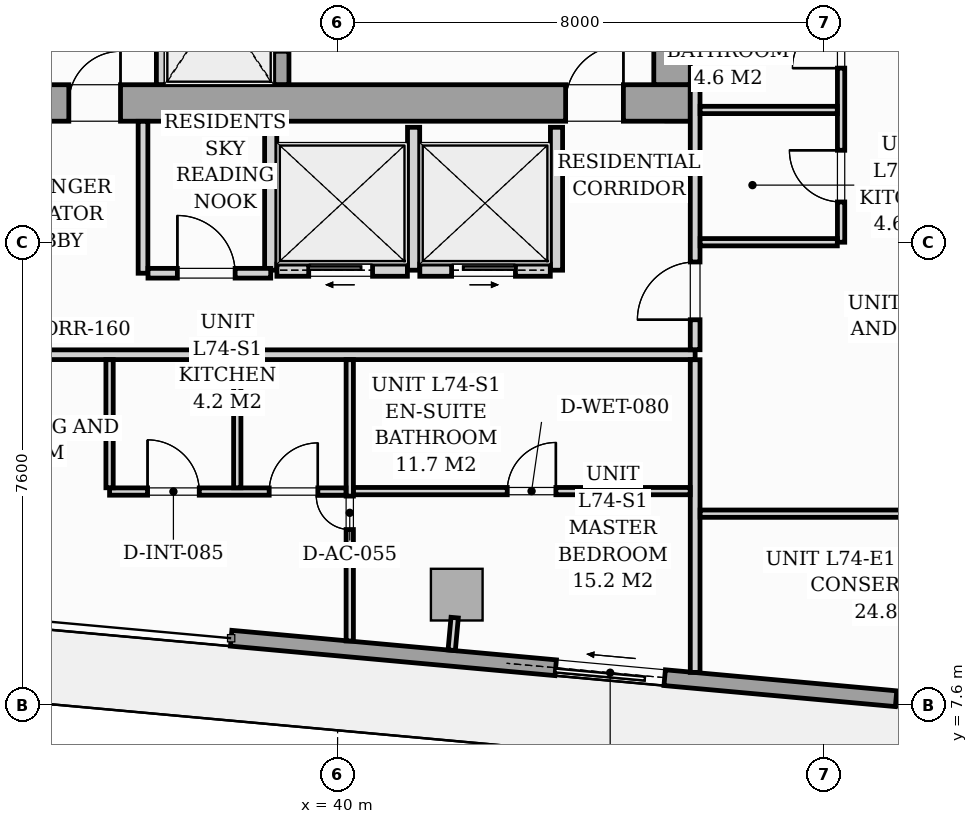
"""IFC4 building model, lengths in metres.
Left out: names, types, materials, properties, quantities, classifications, styles, units other than length and angle.
Written with IfcOpenShell. Run it as: python <this file> out.ifc"""

import sys

from ifc_helpers import new_model, si_unit, direction, frame, frame_2d, origin, origin_2d, place, context, subcontext, project, spatial, rectangle, i_section, extrude, source, transform, mapped, element, fill, save


model = new_model("IFC4")
c1 = context("Model", 3, precision=1e-05, world=origin(), true_north=direction((0.0, 1.0)))
c2 = subcontext(c1, "Body", "Model", "MODEL_VIEW")
j1 = project(units=[si_unit("LENGTHUNIT", "METRE"), si_unit("PLANEANGLEUNIT", "RADIAN")], contexts=[c1])
p1 = place(None, origin())
s1 = spatial("IfcSite", under=j1, at=p1, CompositionType="ELEMENT")
p2 = place(p1, origin())
s2 = spatial("IfcBuilding", under=s1, at=p2, CompositionType="ELEMENT")
p3 = place(p2, frame((0.0, 0.0, 256.2)))
s3 = spatial("IfcBuildingStorey", under=s2, at=p3, CompositionType="ELEMENT", Elevation=256.2)
m1 = source(origin(), c2, "Body", "SweptSolid", [
    extrude(i_section(OverallWidth=0.409, OverallDepth=0.425, WebThickness=0.033, FlangeThickness=0.052, FilletRadius=0.018, at=origin_2d()), origin(), (0.0, 0.0, 1.0), 3.296),
])
for number, where, z_axis, x_axis in (
    (1, (38.88, 17.4, 0.002), (0.0, 0.0, 1.0), (1.0, 0.0, 0.0)),
    (2, (45.6, 17.4, 0.002), (0.0, 0.0, 1.0), (1.0, 0.0, 0.0)),
):
    element("IfcColumn", number, at=place(p3, frame(where, z_axis=z_axis, x_axis=x_axis)), inside=s3, PredefinedType="PILASTER", context=c2, shape_type="MappedRepresentation", body=[
        mapped(m1, transform((0.0, 0.0, 0.0), scale=1.0)),
    ])
m2 = source(origin(), c2, "Body", "SweptSolid", [
    extrude(rectangle(XDim=0.85, YDim=0.85, at=origin_2d()), origin(), (0.0, 0.0, 1.0), 3.294),
])
p4 = place(p3, frame((41.96, 9.415, 0.002), z_axis=(0.0, 0.0, 1.0), x_axis=(0.995884398616, -0.090632580198, 0.0)))
e3 = element("IfcColumn", 3, at=p4, inside=s3, PredefinedType="COLUMN", context=c2, shape_type="MappedRepresentation", body=[
    mapped(m2, transform((0.0, 0.0, 0.0), scale=1.0)),
])
p5 = place(p3, frame((52.819, 7.372, 0.0), z_axis=(0.0, 0.0, 1.0), x_axis=(-0.995884447498, 0.090632043071, 0.0)))
e4 = element("IfcWall", 4, at=p5, inside=s3, PredefinedType="STANDARD", context=c2, shape_type="SweptSolid", body=[
    extrude(rectangle(XDim=14.63, YDim=0.26, at=frame_2d((7.315, 0.0))), origin(), (0.0, 0.0, 1.0), 3.0),
])
p6 = place(p5, frame((7.471, 0.0, 0.0)))
e5 = element("IfcOpeningElement", 5, at=p6, cuts=e4, PredefinedType="OPENING", context=c2, shape_type="SweptSolid", body=[
    extrude(rectangle(XDim=1.8, YDim=2.06, at=frame_2d((0.9, 1.03))), frame((0.0, 0.14, 0.0), z_axis=(0.0, -1.0, 0.0), x_axis=(1.0, 0.0, 0.0)), (0.0, 0.0, 1.0), 0.28),
])
p7 = place(p5, frame((2.05, 0.0, 0.65)))
e6 = element("IfcOpeningElement", 6, at=p7, cuts=e4, PredefinedType="OPENING", context=c2, shape_type="SweptSolid", body=[
    extrude(rectangle(XDim=1.6, YDim=1.5, at=frame_2d((0.8, 0.75))), frame((0.0, 0.14, 0.0), z_axis=(0.0, -1.0, 0.0), x_axis=(1.0, 0.0, 0.0)), (0.0, 0.0, 1.0), 0.28),
])
p8 = place(p3, frame((26.2, 17.5, 0.0), z_axis=(0.0, 0.0, 1.0), x_axis=(1.0, 0.0, 0.0)))
e7 = element("IfcWall", 7, at=p8, inside=s3, PredefinedType="SHEAR", context=c2, shape_type="SweptSolid", body=[
    extrude(rectangle(XDim=19.6, YDim=0.6, at=frame_2d((9.8, 0.0))), origin(), (0.0, 0.0, 1.0), 3.3),
])
p9 = place(p8, frame((0.95, 0.0, 0.0)))
e8 = element("IfcOpeningElement", 8, at=p9, cuts=e7, PredefinedType="OPENING", context=c2, shape_type="SweptSolid", body=[
    extrude(rectangle(XDim=0.95, YDim=2.06, at=frame_2d((0.475, 1.03))), frame((0.0, 0.31, 0.0), z_axis=(0.0, -1.0, 0.0), x_axis=(1.0, 0.0, 0.0)), (0.0, 0.0, 1.0), 0.62),
])
p10 = place(p8, frame((9.38, 0.0, 0.0)))
e9 = element("IfcOpeningElement", 9, at=p10, cuts=e7, PredefinedType="OPENING", context=c2, shape_type="SweptSolid", body=[
    extrude(rectangle(XDim=0.85, YDim=2.0, at=frame_2d((0.425, 1.0))), frame((0.0, 0.31, 0.0), z_axis=(0.0, -1.0, 0.0), x_axis=(1.0, 0.0, 0.0)), (0.0, 0.0, 1.0), 0.62),
])
p11 = place(p8, frame((17.55, 0.0, 0.0)))
e10 = element("IfcOpeningElement", 10, at=p11, cuts=e7, PredefinedType="OPENING", context=c2, shape_type="SweptSolid", body=[
    extrude(rectangle(XDim=0.95, YDim=2.06, at=frame_2d((0.475, 1.03))), frame((0.0, 0.31, 0.0), z_axis=(0.0, -1.0, 0.0), x_axis=(1.0, 0.0, 0.0)), (0.0, 0.0, 1.0), 0.62),
])
p12 = place(p3, frame((45.5, 17.802, 0.0), z_axis=(0.0, 0.0, 1.0), x_axis=(0.0, 1.0, 0.0)))
e11 = element("IfcWall", 11, at=p12, inside=s3, PredefinedType="SHEAR", context=c2, shape_type="SweptSolid", body=[
    extrude(rectangle(XDim=5.796, YDim=0.6, at=frame_2d((2.898, 0.0))), origin(), (0.0, 0.0, 1.0), 3.3),
])
p13 = place(p3, frame((37.1, 17.802, 0.0), z_axis=(0.0, 0.0, 1.0), x_axis=(0.0, 1.0, 0.0)))
e12 = element("IfcWall", 12, at=p13, inside=s3, PredefinedType="PARTITIONING", context=c2, shape_type="SweptSolid", body=[
    extrude(rectangle(XDim=2.646, YDim=0.16, at=frame_2d((1.323, 0.0))), origin(), (0.0, 0.0, 1.0), 3.0),
])
p14 = place(p3, frame((39.075, 17.802, 0.0), z_axis=(0.0, 0.0, 1.0), x_axis=(0.0, 1.0, 0.0)))
e13 = element("IfcWall", 13, at=p14, inside=s3, PredefinedType="SOLIDWALL", context=c2, shape_type="SweptSolid", body=[
    extrude(rectangle(XDim=2.646, YDim=0.25, at=frame_2d((1.323, 0.0))), origin(), (0.0, 0.0, 1.0), 3.3),
])
p15 = place(p14, frame((0.548, 0.0, 0.0)))
e14 = element("IfcOpeningElement", 14, at=p15, cuts=e13, PredefinedType="OPENING", context=c2, shape_type="SweptSolid", body=[
    extrude(rectangle(XDim=1.1, YDim=2.08, at=frame_2d((0.55, 1.04))), frame((0.0, 0.135, 0.0), z_axis=(0.0, -1.0, 0.0), x_axis=(1.0, 0.0, 0.0)), (0.0, 0.0, 1.0), 0.27),
])
for number, where, z_axis, x_axis in (
    (15, (38.9, 14.75, 0.0), (0.0, 0.0, 1.0), (0.0, 1.0, 0.0)),
    (16, (41.25, 14.75, 0.0), (0.0, 0.0, 1.0), (0.0, 1.0, 0.0)),
    (17, (43.6, 14.75, 0.0), (0.0, 0.0, 1.0), (0.0, 1.0, 0.0)),
):
    element("IfcWall", number, at=place(p3, frame(where, z_axis=z_axis, x_axis=x_axis)), inside=s3, PredefinedType="PARTITIONING", context=c2, shape_type="SweptSolid", body=[
        extrude(rectangle(XDim=2.35, YDim=0.2, at=frame_2d((1.175, 0.0))), origin(), (0.0, 0.0, 1.0), 3.0),
    ])
p16 = place(p3, frame((39.002, 14.75, 0.0), z_axis=(0.0, 0.0, 1.0), x_axis=(1.0, 0.0, 0.0)))
e18 = element("IfcWall", 18, at=p16, inside=s3, PredefinedType="PARTITIONING", context=c2, shape_type="SweptSolid", body=[
    extrude(rectangle(XDim=2.146, YDim=0.2, at=frame_2d((1.073, 0.0))), origin(), (0.0, 0.0, 1.0), 3.0),
])
p17 = place(p16, frame((0.523, 0.0, 0.0)))
e19 = element("IfcOpeningElement", 19, at=p17, cuts=e18, PredefinedType="OPENING", context=c2, shape_type="SweptSolid", body=[
    extrude(rectangle(XDim=1.05, YDim=2.08, at=frame_2d((0.525, 1.04))), frame((0.0, 0.11, 0.0), z_axis=(0.0, -1.0, 0.0), x_axis=(1.0, 0.0, 0.0)), (0.0, 0.0, 1.0), 0.22),
])
p18 = place(p3, frame((41.352, 14.75, 0.0), z_axis=(0.0, 0.0, 1.0), x_axis=(1.0, 0.0, 0.0)))
e20 = element("IfcWall", 20, at=p18, inside=s3, PredefinedType="PARTITIONING", context=c2, shape_type="SweptSolid", body=[
    extrude(rectangle(XDim=2.146, YDim=0.2, at=frame_2d((1.073, 0.0))), origin(), (0.0, 0.0, 1.0), 3.0),
])
p19 = place(p18, frame((0.523, 0.0, 0.0)))
e21 = element("IfcOpeningElement", 21, at=p19, cuts=e20, PredefinedType="OPENING", context=c2, shape_type="SweptSolid", body=[
    extrude(rectangle(XDim=1.05, YDim=2.08, at=frame_2d((0.525, 1.04))), frame((0.0, 0.11, 0.0), z_axis=(0.0, -1.0, 0.0), x_axis=(1.0, 0.0, 0.0)), (0.0, 0.0, 1.0), 0.22),
])
p20 = place(p3, frame((24.55, 13.36, 0.0), z_axis=(0.0, 0.0, 1.0), x_axis=(1.0, 0.0, 0.0)))
e22 = element("IfcWall", 22, at=p20, inside=s3, PredefinedType="PARTITIONING", context=c2, shape_type="SweptSolid", body=[
    extrude(rectangle(XDim=21.33, YDim=0.16, at=frame_2d((10.665, 0.0))), origin(), (0.0, 0.0, 1.0), 2.51),
])
p21 = place(p20, frame((5.415, 0.0, 0.0)))
e23 = element("IfcOpeningElement", 23, at=p21, cuts=e22, PredefinedType="OPENING", context=c2, shape_type="SweptSolid", body=[
    extrude(rectangle(XDim=0.95, YDim=2.06, at=frame_2d((0.475, 1.03))), frame((0.0, 0.09, 0.0), z_axis=(0.0, -1.0, 0.0), x_axis=(1.0, 0.0, 0.0)), (0.0, 0.0, 1.0), 0.18),
])
p22 = place(p3, frame((45.88, 8.136, 0.0), z_axis=(0.0, 0.0, 1.0), x_axis=(0.0, 1.0, 0.0)))
e24 = element("IfcWall", 24, at=p22, inside=s3, PredefinedType="PARTITIONING", context=c2, shape_type="SweptSolid", body=[
    extrude(rectangle(XDim=5.142, YDim=0.16, at=frame_2d((2.571, 0.0))), origin(), (0.0, 0.0, 1.0), 3.0),
])
p23 = place(p3, frame((45.88, 13.442, 0.0), z_axis=(0.0, 0.0, 1.0), x_axis=(0.0, 1.0, 0.0)))
e25 = element("IfcWall", 25, at=p23, inside=s3, PredefinedType="PARTITIONING", context=c2, shape_type="SweptSolid", body=[
    extrude(rectangle(XDim=4.36, YDim=0.16, at=frame_2d((2.18, 0.0))), origin(), (0.0, 0.0, 1.0), 3.0),
])
p24 = place(p23, frame((0.493, 0.0, 0.0)))
e26 = element("IfcOpeningElement", 26, at=p24, cuts=e25, PredefinedType="OPENING", context=c2, shape_type="SweptSolid", body=[
    extrude(rectangle(XDim=0.95, YDim=2.06, at=frame_2d((0.475, 1.03))), frame((0.0, 0.09, 0.0), z_axis=(0.0, -1.0, 0.0), x_axis=(1.0, 0.0, 0.0)), (0.0, 0.0, 1.0), 0.18),
])
p25 = place(p3, frame((40.2, 8.653, 0.0), z_axis=(0.0, 0.0, 1.0), x_axis=(0.0, 1.0, 0.0)))
e27 = element("IfcWall", 27, at=p25, inside=s3, PredefinedType="PARTITIONING", context=c2, shape_type="SweptSolid", body=[
    extrude(rectangle(XDim=4.625, YDim=0.12, at=frame_2d((2.312, 0.0))), origin(), (0.0, 0.0, 1.0), 3.0),
])
p26 = place(p25, frame((1.832, 0.0, 0.0)))
e28 = element("IfcOpeningElement", 28, at=p26, cuts=e27, PredefinedType="OPENING", context=c2, shape_type="SweptSolid", body=[
    extrude(rectangle(XDim=0.55, YDim=2.0, at=frame_2d((0.275, 1.0))), frame((0.0, 0.07, 0.0), z_axis=(0.0, -1.0, 0.0), x_axis=(1.0, 0.0, 0.0)), (0.0, 0.0, 1.0), 0.14),
])
p27 = place(p3, frame((36.25, 11.11, 0.0), z_axis=(0.0, 0.0, 1.0), x_axis=(1.0, 0.0, 0.0)))
e29 = element("IfcWall", 29, at=p27, inside=s3, PredefinedType="PARTITIONING", context=c2, shape_type="SweptSolid", body=[
    extrude(rectangle(XDim=3.888, YDim=0.12, at=frame_2d((1.944, 0.0))), origin(), (0.0, 0.0, 1.0), 3.0),
])
p28 = place(p27, frame((0.625, 0.0, 0.0)))
e30 = element("IfcOpeningElement", 30, at=p28, cuts=e29, PredefinedType="OPENING", context=c2, shape_type="SweptSolid", body=[
    extrude(rectangle(XDim=0.85, YDim=2.05, at=frame_2d((0.425, 1.025))), frame((0.0, 0.07, 0.0), z_axis=(0.0, -1.0, 0.0), x_axis=(1.0, 0.0, 0.0)), (0.0, 0.0, 1.0), 0.14),
])
p29 = place(p27, frame((2.625, 0.0, 0.0)))
e31 = element("IfcOpeningElement", 31, at=p29, cuts=e29, PredefinedType="OPENING", context=c2, shape_type="SweptSolid", body=[
    extrude(rectangle(XDim=0.8, YDim=2.02, at=frame_2d((0.4, 1.01))), frame((0.0, 0.07, 0.0), z_axis=(0.0, -1.0, 0.0), x_axis=(1.0, 0.0, 0.0)), (0.0, 0.0, 1.0), 0.14),
])
for number, where, z_axis, x_axis in (
    (32, (38.35, 11.172, 0.0), (0.0, 0.0, 1.0), (0.0, 1.0, 0.0)),
    (33, (36.25, 11.172, 0.0), (0.0, 0.0, 1.0), (0.0, 1.0, 0.0)),
):
    element("IfcWall", number, at=place(p3, frame(where, z_axis=z_axis, x_axis=x_axis)), inside=s3, PredefinedType="PARTITIONING", context=c2, shape_type="SweptSolid", body=[
        extrude(rectangle(XDim=2.106, YDim=0.12, at=frame_2d((1.053, 0.0))), origin(), (0.0, 0.0, 1.0), 3.0),
    ])
p30 = place(p3, frame((40.262, 11.117, 0.0), z_axis=(0.0, 0.0, 1.0), x_axis=(1.0, 0.0, 0.0)))
e34 = element("IfcWall", 34, at=p30, inside=s3, PredefinedType="PARTITIONING", context=c2, shape_type="SweptSolid", body=[
    extrude(rectangle(XDim=5.536, YDim=0.12, at=frame_2d((2.768, 0.0))), origin(), (0.0, 0.0, 1.0), 3.0),
])
p31 = place(p30, frame((2.528, 0.0, 0.0)))
e35 = element("IfcOpeningElement", 35, at=p31, cuts=e34, PredefinedType="OPENING", context=c2, shape_type="SweptSolid", body=[
    extrude(rectangle(XDim=0.8, YDim=2.02, at=frame_2d((0.4, 1.01))), frame((0.0, 0.07, 0.0), z_axis=(0.0, -1.0, 0.0), x_axis=(1.0, 0.0, 0.0)), (0.0, 0.0, 1.0), 0.14),
])
p32 = place(p3, frame((48.28, 15.21, 0.0), z_axis=(0.0, 0.0, 1.0), x_axis=(0.0, 1.0, 0.0)))
e36 = element("IfcWall", 36, at=p32, inside=s3, PredefinedType="PARTITIONING", context=c2, shape_type="SweptSolid", body=[
    extrude(rectangle(XDim=4.35, YDim=0.12, at=frame_2d((2.175, 0.0))), origin(), (0.0, 0.0, 1.0), 3.0),
])
p33 = place(p32, frame((0.662, 0.0, 0.0)))
e37 = element("IfcOpeningElement", 37, at=p33, cuts=e36, PredefinedType="OPENING", context=c2, shape_type="SweptSolid", body=[
    extrude(rectangle(XDim=0.85, YDim=2.05, at=frame_2d((0.425, 1.025))), frame((0.0, 0.07, 0.0), z_axis=(0.0, -1.0, 0.0), x_axis=(1.0, 0.0, 0.0)), (0.0, 0.0, 1.0), 0.14),
])
p34 = place(p32, frame((2.863, 0.0, 0.0)))
e38 = element("IfcOpeningElement", 38, at=p34, cuts=e36, PredefinedType="OPENING", context=c2, shape_type="SweptSolid", body=[
    extrude(rectangle(XDim=0.8, YDim=2.02, at=frame_2d((0.4, 1.01))), frame((0.0, 0.07, 0.0), z_axis=(0.0, -1.0, 0.0), x_axis=(1.0, 0.0, 0.0)), (0.0, 0.0, 1.0), 0.14),
])
p35 = place(p3, frame((45.962, 17.385, 0.0), z_axis=(0.0, 0.0, 1.0), x_axis=(1.0, 0.0, 0.0)))
e39 = element("IfcWall", 39, at=p35, inside=s3, PredefinedType="PARTITIONING", context=c2, shape_type="SweptSolid", body=[
    extrude(rectangle(XDim=2.256, YDim=0.12, at=frame_2d((1.128, 0.0))), origin(), (0.0, 0.0, 1.0), 2.342),
])
p36 = place(p3, frame((45.962, 15.21, 0.0), z_axis=(0.0, 0.0, 1.0), x_axis=(1.0, 0.0, 0.0)))
e40 = element("IfcWall", 40, at=p36, inside=s3, PredefinedType="PARTITIONING", context=c2, shape_type="SweptSolid", body=[
    extrude(rectangle(XDim=2.256, YDim=0.12, at=frame_2d((1.128, 0.0))), origin(), (0.0, 0.0, 1.0), 3.0),
])
p37 = place(p3, frame((45.962, 10.746, 0.0), z_axis=(0.0, 0.0, 1.0), x_axis=(1.0, 0.0, 0.0)))
e41 = element("IfcWall", 41, at=p37, inside=s3, PredefinedType="PARTITIONING", context=c2, shape_type="SweptSolid", body=[
    extrude(rectangle(XDim=9.594, YDim=0.12, at=frame_2d((4.797, 0.0))), origin(), (0.0, 0.0, 1.0), 3.0),
])
p38 = place(p37, frame((4.378, 0.0, 0.0)))
e42 = element("IfcOpeningElement", 42, at=p38, cuts=e41, PredefinedType="OPENING", context=c2, shape_type="SweptSolid", body=[
    extrude(rectangle(XDim=0.85, YDim=2.05, at=frame_2d((0.425, 1.025))), frame((0.0, 0.07, 0.0), z_axis=(0.0, -1.0, 0.0), x_axis=(1.0, 0.0, 0.0)), (0.0, 0.0, 1.0), 0.14),
])
p39 = place(p3, frame((36.8, 14.7, 0.0), z_axis=(0.0, 0.0, 1.0), x_axis=(0.0, 1.0, 0.0)))
e43 = element("IfcWall", 43, at=p39, inside=s3, PredefinedType="PARTITIONING", context=c2, shape_type="SweptSolid", body=[
    extrude(rectangle(XDim=2.498, YDim=0.16, at=frame_2d((1.249, 0.0))), origin(), (0.0, 0.0, 1.0), 3.0),
])
p40 = place(p3, frame((36.882, 14.7, 0.0), z_axis=(0.0, 0.0, 1.0), x_axis=(1.0, 0.0, 0.0)))
e44 = element("IfcWall", 44, at=p40, inside=s3, PredefinedType="PARTITIONING", context=c2, shape_type="SweptSolid", body=[
    extrude(rectangle(XDim=2.018, YDim=0.16, at=frame_2d((1.009, 0.0))), origin(), (0.0, 0.0, 1.0), 3.0),
])
p41 = place(p40, frame((0.483, 0.0, 0.0)))
e45 = element("IfcOpeningElement", 45, at=p41, cuts=e44, PredefinedType="OPENING", context=c2, shape_type="SweptSolid", body=[
    extrude(rectangle(XDim=0.95, YDim=2.06, at=frame_2d((0.475, 1.03))), frame((0.0, 0.09, 0.0), z_axis=(0.0, -1.0, 0.0), x_axis=(1.0, 0.0, 0.0)), (0.0, 0.0, 1.0), 0.18),
])
p42 = place(p3, frame((41.925, 9.036, 0.0), z_axis=(0.0, 0.0, 1.0), x_axis=(-0.090740281653, -0.995874591144, 0.0)))
e46 = element("IfcWall", 46, at=p42, inside=s3, PredefinedType="PARTITIONING", context=c2, shape_type="SweptSolid", body=[
    extrude(rectangle(XDim=0.538, YDim=0.12, at=frame_2d((0.269, 0.0))), origin(), (0.0, 0.0, 1.0), 3.0),
])
m3 = source(origin(), c2, "Body", "SweptSolid", [
    extrude(rectangle(XDim=1.8, YDim=2.06, at=frame_2d((0.9, 1.03))), frame((0.0, 0.025, 0.0), z_axis=(0.0, -1.0, 0.0), x_axis=(1.0, 0.0, 0.0)), (0.0, 0.0, 1.0), 0.05),
])
p43 = place(p6, origin())
e47 = element("IfcDoor", 47, at=p43, inside=s3, OperationType="SLIDING_TO_RIGHT", PredefinedType="DOOR", context=c2, shape_type="MappedRepresentation", body=[
    mapped(m3, transform((0.0, 0.0, 0.0), scale=1.0)),
])
fill(e5, e47)
m4 = source(origin(), c2, "Body", "SweptSolid", [
    extrude(rectangle(XDim=1.6, YDim=1.5, at=frame_2d((0.8, 0.75))), frame((0.0, 0.03, 0.0), z_axis=(0.0, -1.0, 0.0), x_axis=(1.0, 0.0, 0.0)), (0.0, 0.0, 1.0), 0.06),
])
p44 = place(p7, origin())
e48 = element("IfcWindow", 48, at=p44, inside=s3, PartitioningType="SINGLE_PANEL", PredefinedType="WINDOW", context=c2, shape_type="MappedRepresentation", body=[
    mapped(m4, transform((0.0, 0.0, 0.0), scale=1.0)),
])
fill(e6, e48)
m5 = source(origin(), c2, "Body", "SweptSolid", [
    extrude(rectangle(XDim=0.85, YDim=2.0, at=frame_2d((0.425, 1.0))), frame((0.0, 0.025, 0.0), z_axis=(0.0, -1.0, 0.0), x_axis=(1.0, 0.0, 0.0)), (0.0, 0.0, 1.0), 0.05),
])
p45 = place(p10, origin())
e49 = element("IfcDoor", 49, at=p45, inside=s3, OperationType="SINGLE_SWING_RIGHT", PredefinedType="DOOR", context=c2, shape_type="MappedRepresentation", body=[
    mapped(m5, transform((0.0, 0.0, 0.0), scale=1.0)),
])
fill(e9, e49)
m6 = source(origin(), c2, "Body", "SweptSolid", [
    extrude(rectangle(XDim=0.95, YDim=2.06, at=frame_2d((0.475, 1.03))), frame((0.0, 0.025, 0.0), z_axis=(0.0, -1.0, 0.0), x_axis=(1.0, 0.0, 0.0)), (0.0, 0.0, 1.0), 0.05),
])
p46 = place(p11, origin())
e50 = element("IfcDoor", 50, at=p46, inside=s3, OperationType="SINGLE_SWING_RIGHT", PredefinedType="DOOR", context=c2, shape_type="MappedRepresentation", body=[
    mapped(m6, transform((0.0, 0.0, 0.0), scale=1.0)),
])
fill(e10, e50)
m7 = source(origin(), c2, "Body", "SweptSolid", [
    extrude(rectangle(XDim=1.05, YDim=2.08, at=frame_2d((0.525, 1.04))), frame((0.0, 0.025, 0.0), z_axis=(0.0, -1.0, 0.0), x_axis=(1.0, 0.0, 0.0)), (0.0, 0.0, 1.0), 0.05),
])
p47 = place(p17, origin())
e51 = element("IfcDoor", 51, at=p47, inside=s3, OperationType="SLIDING_TO_LEFT", PredefinedType="DOOR", context=c2, shape_type="MappedRepresentation", body=[
    mapped(m7, transform((0.0, 0.0, 0.0), scale=1.0)),
])
fill(e19, e51)
p48 = place(p19, origin())
e52 = element("IfcDoor", 52, at=p48, inside=s3, OperationType="SLIDING_TO_RIGHT", PredefinedType="DOOR", context=c2, shape_type="MappedRepresentation", body=[
    mapped(m7, transform((0.0, 0.0, 0.0), scale=1.0)),
])
fill(e21, e52)
m8 = source(origin(), c2, "Body", "SweptSolid", [
    extrude(rectangle(XDim=0.8, YDim=2.02, at=frame_2d((0.4, 1.01))), frame((0.0, 0.025, 0.0), z_axis=(0.0, -1.0, 0.0), x_axis=(1.0, 0.0, 0.0)), (0.0, 0.0, 1.0), 0.05),
])
p49 = place(p31, origin())
e53 = element("IfcDoor", 53, at=p49, inside=s3, OperationType="SINGLE_SWING_RIGHT", PredefinedType="DOOR", context=c2, shape_type="MappedRepresentation", body=[
    mapped(m8, transform((0.0, 0.0, 0.0), scale=1.0)),
])
fill(e35, e53)
m9 = source(origin(), c2, "Body", "SweptSolid", [
    extrude(rectangle(XDim=0.55, YDim=2.0, at=frame_2d((0.275, 1.0))), frame((0.0, 0.025, 0.0), z_axis=(0.0, -1.0, 0.0), x_axis=(1.0, 0.0, 0.0)), (0.0, 0.0, 1.0), 0.05),
])
p50 = place(p26, origin())
e54 = element("IfcDoor", 54, at=p50, inside=s3, OperationType="SINGLE_SWING_RIGHT", PredefinedType="DOOR", context=c2, shape_type="MappedRepresentation", body=[
    mapped(m9, transform((0.0, 0.0, 0.0), scale=1.0)),
])
fill(e28, e54)
m10 = source(origin(), c2, "Body", "SweptSolid", [
    extrude(rectangle(XDim=0.85, YDim=2.05, at=frame_2d((0.425, 1.025))), frame((0.0, 0.025, 0.0), z_axis=(0.0, -1.0, 0.0), x_axis=(1.0, 0.0, 0.0)), (0.0, 0.0, 1.0), 0.05),
])
p51 = place(p28, origin())
e55 = element("IfcDoor", 55, at=p51, inside=s3, OperationType="SINGLE_SWING_LEFT", PredefinedType="DOOR", context=c2, shape_type="MappedRepresentation", body=[
    mapped(m10, transform((0.0, 0.0, 0.0), scale=1.0)),
])
fill(e30, e55)
p52 = place(p29, origin())
e56 = element("IfcDoor", 56, at=p52, inside=s3, OperationType="SINGLE_SWING_RIGHT", PredefinedType="DOOR", context=c2, shape_type="MappedRepresentation", body=[
    mapped(m8, transform((0.0, 0.0, 0.0), scale=1.0)),
])
fill(e31, e56)
m11 = source(origin(), c2, "Body", "SweptSolid", [
    extrude(rectangle(XDim=0.95, YDim=2.06, at=frame_2d((0.475, 1.03))), frame((0.0, 0.025, 0.0), z_axis=(0.0, -1.0, 0.0), x_axis=(1.0, 0.0, 0.0)), (0.0, 0.0, 1.0), 0.05),
])
p53 = place(p24, origin())
e57 = element("IfcDoor", 57, at=p53, inside=s3, OperationType="SINGLE_SWING_LEFT", PredefinedType="DOOR", context=c2, shape_type="MappedRepresentation", body=[
    mapped(m11, transform((0.0, 0.0, 0.0), scale=1.0)),
])
fill(e26, e57)
p54 = place(p33, origin())
e58 = element("IfcDoor", 58, at=p54, inside=s3, OperationType="SINGLE_SWING_RIGHT", PredefinedType="DOOR", context=c2, shape_type="MappedRepresentation", body=[
    mapped(m10, transform((0.0, 0.0, 0.0), scale=1.0)),
])
fill(e37, e58)
p55 = place(p34, origin())
e59 = element("IfcDoor", 59, at=p55, inside=s3, OperationType="SINGLE_SWING_LEFT", PredefinedType="DOOR", context=c2, shape_type="MappedRepresentation", body=[
    mapped(m8, transform((0.0, 0.0, 0.0), scale=1.0)),
])
fill(e38, e59)
p56 = place(p41, origin())
e60 = element("IfcDoor", 60, at=p56, inside=s3, OperationType="SINGLE_SWING_LEFT", PredefinedType="DOOR", context=c2, shape_type="MappedRepresentation", body=[
    mapped(m11, transform((0.0, 0.0, 0.0), scale=1.0)),
])
fill(e45, e60)
save(model, sys.argv[1])
